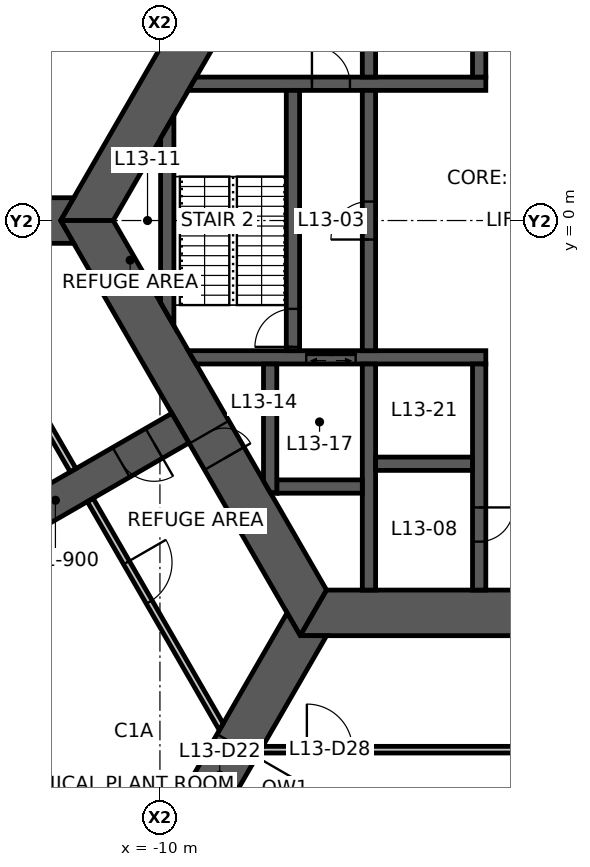
"""IFC4 building model, lengths in metres.
Left out: names, types, materials, properties, quantities, classifications, styles, units other than length and angle.
Written with IfcOpenShell. Run it as: python <this file> out.ifc"""

import sys

from ifc_helpers import new_model, si_unit, direction, frame, frame_2d, origin, place, context, subcontext, project, spatial, polyline, rectangle, outline, extrude, element, fill, save


model = new_model("IFC4")
c1 = context("Model", 3, precision=1e-05, world=origin(), true_north=direction((0.0, 1.0)))
c2 = subcontext(c1, "Body", "Model", "MODEL_VIEW")
j1 = project(units=[si_unit("LENGTHUNIT", "METRE"), si_unit("PLANEANGLEUNIT", "RADIAN")], contexts=[c1])
p1 = place(None, origin())
s1 = spatial("IfcSite", under=j1, at=p1, CompositionType="ELEMENT")
p2 = place(p1, origin())
s2 = spatial("IfcBuilding", under=s1, at=p2, CompositionType="ELEMENT")
p3 = place(p2, frame((0.0, 0.0, 52.0)))
s3 = spatial("IfcBuildingStorey", under=s2, at=p3, CompositionType="ELEMENT", Elevation=52.0)
p4 = place(p3, frame((-5.961, 10.325, 0.0), z_axis=(0.0, 0.0, 1.0), x_axis=(-0.500004296715, -0.866022923061, 0.0)))
e1 = element("IfcWall", 1, at=p4, inside=s3, PredefinedType="SHEAR", context=c2, shape_type="SweptSolid", body=[
    extrude(outline(polyline([(-0.346, -0.6), (4.494, -0.6), (5.494, -0.6), (12.269, -0.6), (11.576, 0.6), (5.494, 0.6), (4.494, 0.6), (0.346, 0.6), (-0.346, -0.6)])), origin(), (0.0, 0.0, 1.0), 5.0),
])
p5 = place(p4, frame((4.494, 0.0, 0.0)))
e2 = element("IfcOpeningElement", 2, at=p5, cuts=e1, PredefinedType="OPENING", context=c2, shape_type="SweptSolid", body=[
    extrude(rectangle(XDim=1.0, YDim=2.1, at=frame_2d((0.5, 1.05))), frame((0.0, 0.61, 0.0), z_axis=(0.0, -1.0, 0.0), x_axis=(1.0, 0.0, 0.0)), (0.0, 0.0, 1.0), 1.22),
])
p6 = place(p3, frame((-11.922, 0.0, 0.0), z_axis=(0.0, 0.0, 1.0), x_axis=(0.500004296715, -0.866022923061, 0.0)))
e3 = element("IfcWall", 3, at=p6, inside=s3, PredefinedType="SHEAR", context=c2, shape_type="SweptSolid", body=[
    extrude(outline(polyline([(-0.346, -0.6), (6.431, -0.6), (7.231, -0.6), (12.269, -0.6), (11.576, 0.6), (7.231, 0.6), (6.431, 0.6), (0.346, 0.6), (-0.346, -0.6)])), origin(), (0.0, 0.0, 1.0), 5.0),
])
p7 = place(p6, frame((6.431, 0.0, 0.0)))
e4 = element("IfcOpeningElement", 4, at=p7, cuts=e3, PredefinedType="OPENING", context=c2, shape_type="SweptSolid", body=[
    extrude(rectangle(XDim=0.8, YDim=2.1, at=frame_2d((0.4, 1.05))), frame((0.0, 0.61, 0.0), z_axis=(0.0, -1.0, 0.0), x_axis=(1.0, 0.0, 0.0)), (0.0, 0.0, 1.0), 1.22),
])
p8 = place(p3, frame((-5.961, -10.325, 0.0), z_axis=(0.0, 0.0, 1.0), x_axis=(1.0, 0.0, 0.0)))
e5 = element("IfcWall", 5, at=p8, inside=s3, PredefinedType="SHEAR", context=c2, shape_type="SweptSolid", body=[
    extrude(outline(polyline([(-0.346, -0.6), (5.461, -0.6), (6.461, -0.6), (12.269, -0.6), (11.576, 0.6), (6.461, 0.6), (5.461, 0.6), (0.346, 0.6), (-0.346, -0.6)])), origin(), (0.0, 0.0, 1.0), 5.0),
])
p9 = place(p8, frame((5.461, 0.0, 0.0)))
e6 = element("IfcOpeningElement", 6, at=p9, cuts=e5, PredefinedType="OPENING", context=c2, shape_type="SweptSolid", body=[
    extrude(rectangle(XDim=1.0, YDim=2.1, at=frame_2d((0.5, 1.05))), frame((0.0, 0.61, 0.0), z_axis=(0.0, -1.0, 0.0), x_axis=(1.0, 0.0, 0.0)), (0.0, 0.0, 1.0), 1.22),
])
p10 = place(p3, frame((-9.461, -5.462, 0.0), z_axis=(0.0, 0.0, 1.0), x_axis=(-0.866019116917, -0.500010889016, 0.0)))
e7 = element("IfcWall", 7, at=p10, inside=s3, PredefinedType="SHEAR", context=c2, shape_type="SweptSolid", body=[
    extrude(rectangle(XDim=7.595, YDim=0.9, at=frame_2d((3.798, 0.0))), origin(), (0.0, 0.0, 1.0), 5.0),
])
p11 = place(p10, frame((0.8, 0.0, 0.0)))
e8 = element("IfcOpeningElement", 8, at=p11, cuts=e7, PredefinedType="OPENING", context=c2, shape_type="SweptSolid", body=[
    extrude(rectangle(XDim=1.0, YDim=2.1, at=frame_2d((0.5, 1.05))), frame((0.0, 0.46, 0.0), z_axis=(0.0, -1.0, 0.0), x_axis=(1.0, 0.0, 0.0)), (0.0, 0.0, 1.0), 0.92),
])
p12 = place(p3, frame((-12.615, 0.0, -1.15), z_axis=(0.0, 0.0, 1.0), x_axis=(-1.0, 0.0, 0.0)))
e9 = element("IfcWall", 9, at=p12, inside=s3, PredefinedType="SHEAR", context=c2, shape_type="SweptSolid", body=[
    extrude(outline(polyline([(-0.346, -0.6), (7.385, -0.6), (7.385, 0.6), (-0.346, 0.6), (0.0, 0.0), (-0.346, -0.6)])), origin(), (0.0, 0.0, 1.0), 6.15),
])
p13 = place(p3, frame((-6.308, -10.925, -1.15), z_axis=(0.0, 0.0, 1.0), x_axis=(-0.499993363642, -0.866029235253, 0.0)))
e10 = element("IfcWall", 10, at=p13, inside=s3, PredefinedType="SHEAR", context=c2, shape_type="SweptSolid", body=[
    extrude(outline(polyline([(-0.346, -0.6), (3.338, -0.6), (5.138, -0.6), (7.385, -0.6), (7.385, 0.6), (5.138, 0.6), (3.338, 0.6), (-0.346, 0.6), (0.0, 0.0), (-0.346, -0.6)])), origin(), (0.0, 0.0, 1.0), 6.15),
])
p14 = place(p13, frame((3.338, 0.0, 1.15)))
e11 = element("IfcOpeningElement", 11, at=p14, cuts=e10, PredefinedType="OPENING", context=c2, shape_type="SweptSolid", body=[
    extrude(rectangle(XDim=1.8, YDim=2.4, at=frame_2d((0.9, 1.2))), frame((0.0, 0.61, 0.0), z_axis=(0.0, -1.0, 0.0), x_axis=(1.0, 0.0, 0.0)), (0.0, 0.0, 1.0), 1.22),
])
p15 = place(p3, frame((-10.65, 17.395, 0.0), z_axis=(0.0, 0.0, 1.0), x_axis=(-0.499999841607, -0.866025495233, 0.0)))
e12 = element("IfcWall", 12, at=p15, inside=s3, PredefinedType="ELEMENTEDWALL", context=c2, shape_type="SweptSolid", body=[
    extrude(rectangle(XDim=19.479, YDim=0.2, at=frame_2d((9.739, 0.0))), origin(), (0.0, 0.0, 1.0), 5.0),
])
p16 = place(p3, frame((-9.151, 3.6, 0.0), z_axis=(0.0, 0.0, 1.0), x_axis=(1.0, 0.0, 0.0)))
e13 = element("IfcWall", 13, at=p16, inside=s3, PredefinedType="SHEAR", context=c2, shape_type="SweptSolid", body=[
    extrude(outline(polyline([(-0.101, -0.175), (3.151, -0.175), (4.151, -0.175), (7.726, -0.175), (7.726, 0.175), (4.151, 0.175), (3.151, 0.175), (0.101, 0.175), (-0.101, -0.175)])), origin(), (0.0, 0.0, 1.0), 5.0),
])
p17 = place(p16, frame((3.151, 0.0, 0.0)))
e14 = element("IfcOpeningElement", 14, at=p17, cuts=e13, PredefinedType="OPENING", context=c2, shape_type="SweptSolid", body=[
    extrude(rectangle(XDim=1.0, YDim=2.1, at=frame_2d((0.5, 1.05))), frame((0.0, 0.185, 0.0), z_axis=(0.0, -1.0, 0.0), x_axis=(1.0, 0.0, 0.0)), (0.0, 0.0, 1.0), 0.37),
])
p18 = place(p3, frame((-9.151, -3.6, 0.0), z_axis=(0.0, 0.0, 1.0), x_axis=(1.0, 0.0, 0.0)))
e15 = element("IfcWall", 15, at=p18, inside=s3, PredefinedType="SHEAR", context=c2, shape_type="SweptSolid", body=[
    extrude(outline(polyline([(0.101, -0.175), (3.001, -0.175), (4.301, -0.175), (7.726, -0.175), (7.726, 0.175), (4.301, 0.175), (3.001, 0.175), (-0.101, 0.175), (0.101, -0.175)])), origin(), (0.0, 0.0, 1.0), 5.0),
])
p19 = place(p18, frame((3.001, 0.0, 0.0)))
e16 = element("IfcOpeningElement", 16, at=p19, cuts=e15, PredefinedType="OPENING", context=c2, shape_type="SweptSolid", body=[
    extrude(rectangle(XDim=1.3, YDim=2.1, at=frame_2d((0.65, 1.05))), frame((0.0, 0.185, 0.0), z_axis=(0.0, -1.0, 0.0), x_axis=(1.0, 0.0, 0.0)), (0.0, 0.0, 1.0), 0.37),
])
p20 = place(p3, frame((-1.6, 3.775, 0.0), z_axis=(0.0, 0.0, 1.0), x_axis=(0.0, 1.0, 0.0)))
e17 = element("IfcWall", 17, at=p20, inside=s3, PredefinedType="SHEAR", context=c2, shape_type="SweptSolid", body=[
    extrude(rectangle(XDim=5.95, YDim=0.35, at=frame_2d((2.975, 0.0))), origin(), (0.0, 0.0, 1.0), 5.0),
])
p21 = place(p20, frame((3.775, 0.0, 0.0)))
e18 = element("IfcOpeningElement", 18, at=p21, cuts=e17, PredefinedType="OPENING", context=c2, shape_type="SweptSolid", body=[
    extrude(rectangle(XDim=0.9, YDim=2.1, at=frame_2d((0.45, 1.05))), frame((0.0, 0.185, 0.0), z_axis=(0.0, -1.0, 0.0), x_axis=(1.0, 0.0, 0.0)), (0.0, 0.0, 1.0), 0.37),
])
p22 = place(p3, frame((-1.6, -3.775, 0.0), z_axis=(0.0, 0.0, 1.0), x_axis=(0.0, -1.0, 0.0)))
e19 = element("IfcWall", 19, at=p22, inside=s3, PredefinedType="SHEAR", context=c2, shape_type="SweptSolid", body=[
    extrude(rectangle(XDim=5.95, YDim=0.35, at=frame_2d((2.975, 0.0))), origin(), (0.0, 0.0, 1.0), 5.0),
])
p23 = place(p22, frame((3.775, 0.0, 0.0)))
e20 = element("IfcOpeningElement", 20, at=p23, cuts=e19, PredefinedType="OPENING", context=c2, shape_type="SweptSolid", body=[
    extrude(rectangle(XDim=0.9, YDim=2.1, at=frame_2d((0.45, 1.05))), frame((0.0, 0.185, 0.0), z_axis=(0.0, -1.0, 0.0), x_axis=(1.0, 0.0, 0.0)), (0.0, 0.0, 1.0), 0.37),
])
p24 = place(p3, frame((-4.5, -3.425, 0.0), z_axis=(0.0, 0.0, 1.0), x_axis=(0.0, 1.0, 0.0)))
e21 = element("IfcWall", 21, at=p24, inside=s3, PredefinedType="SHEAR", context=c2, shape_type="SweptSolid", body=[
    extrude(rectangle(XDim=6.85, YDim=0.35, at=frame_2d((3.425, 0.0))), origin(), (0.0, 0.0, 1.0), 5.0),
])
p25 = place(p24, frame((2.925, 0.0, 0.0)))
e22 = element("IfcOpeningElement", 22, at=p25, cuts=e21, PredefinedType="OPENING", context=c2, shape_type="SweptSolid", body=[
    extrude(rectangle(XDim=1.0, YDim=2.1, at=frame_2d((0.5, 1.05))), frame((0.0, 0.185, 0.0), z_axis=(0.0, -1.0, 0.0), x_axis=(1.0, 0.0, 0.0)), (0.0, 0.0, 1.0), 0.37),
])
p26 = place(p3, frame((-6.5, -3.425, 0.0), z_axis=(0.0, 0.0, 1.0), x_axis=(0.0, 1.0, 0.0)))
e23 = element("IfcWall", 23, at=p26, inside=s3, PredefinedType="SHEAR", context=c2, shape_type="SweptSolid", body=[
    extrude(rectangle(XDim=6.85, YDim=0.35, at=frame_2d((3.425, 0.0))), origin(), (0.0, 0.0, 1.0), 5.0),
])
p27 = place(p26, frame((0.1, 0.0, 0.0)))
e24 = element("IfcOpeningElement", 24, at=p27, cuts=e23, PredefinedType="OPENING", context=c2, shape_type="SweptSolid", body=[
    extrude(rectangle(XDim=1.0, YDim=2.1, at=frame_2d((0.5, 1.05))), frame((0.0, 0.185, 0.0), z_axis=(0.0, -1.0, 0.0), x_axis=(1.0, 0.0, 0.0)), (0.0, 0.0, 1.0), 0.37),
])
for number, where, z_axis, x_axis in (
    (25, (-4.5, 3.775, 0.0), (0.0, 0.0, 1.0), (0.0, 1.0, 0.0)),
    (26, (-4.5, -3.775, 0.0), (0.0, 0.0, 1.0), (0.0, -1.0, 0.0)),
):
    element("IfcWall", number, at=place(p3, frame(where, z_axis=z_axis, x_axis=x_axis)), inside=s3, PredefinedType="SHEAR", context=c2, shape_type="SweptSolid", body=[
        extrude(rectangle(XDim=5.95, YDim=0.35, at=frame_2d((2.975, 0.0))), origin(), (0.0, 0.0, 1.0), 5.0),
    ])
p28 = place(p3, frame((-4.325, -6.4, 0.0), z_axis=(0.0, 0.0, 1.0), x_axis=(1.0, 0.0, 0.0)))
e27 = element("IfcWall", 27, at=p28, inside=s3, PredefinedType="SHEAR", context=c2, shape_type="SweptSolid", body=[
    extrude(rectangle(XDim=2.55, YDim=0.35, at=frame_2d((1.275, 0.0))), origin(), (0.0, 0.0, 1.0), 5.0),
])
p29 = place(p3, frame((-6.925, -7.0, 0.0), z_axis=(0.0, 0.0, 1.0), x_axis=(1.0, 0.0, 0.0)))
e28 = element("IfcWall", 28, at=p29, inside=s3, PredefinedType="SHEAR", context=c2, shape_type="SweptSolid", body=[
    extrude(rectangle(XDim=2.25, YDim=0.35, at=frame_2d((1.125, 0.0))), origin(), (0.0, 0.0, 1.0), 5.0),
])
p30 = place(p3, frame((-7.1, -3.775, 0.0), z_axis=(0.0, 0.0, 1.0), x_axis=(0.0, -1.0, 0.0)))
e29 = element("IfcWall", 29, at=p30, inside=s3, PredefinedType="SHEAR", context=c2, shape_type="SweptSolid", body=[
    extrude(outline(polyline([(0.0, -0.175), (3.074, -0.175), (3.377, 0.0), (3.4, 0.175), (0.0, 0.175), (0.0, -0.175)])), origin(), (0.0, 0.0, 1.0), 5.0),
])
p31 = place(p3, frame((-9.808, -2.462, 0.0), z_axis=(0.0, 0.0, 1.0), x_axis=(0.0, 1.0, 0.0)))
e30 = element("IfcWall", 30, at=p31, inside=s3, PredefinedType="SHEAR", context=c2, shape_type="SweptSolid", body=[
    extrude(outline(polyline([(-0.303, -0.175), (5.228, -0.175), (4.621, 0.175), (0.303, 0.175), (-0.303, -0.175)])), origin(), (0.0, 0.0, 1.0), 5.0),
])
p32 = place(p3, frame((-8.386, 13.325, 0.0), z_axis=(0.0, 0.0, 1.0), x_axis=(-0.500011547171, -0.866018736919, 0.0)))
e31 = element("IfcWall", 31, at=p32, inside=s3, PredefinedType="PARTITIONING", context=c2, shape_type="SweptSolid", body=[
    extrude(outline(polyline([(-0.051, -0.087), (1.213, -0.087), (2.413, -0.087), (14.744, -0.087), (14.643, 0.087), (2.413, 0.087), (1.213, 0.087), (0.051, 0.087), (-0.051, -0.087)])), origin(), (0.0, 0.0, 1.0), 4.83),
])
p33 = place(p32, frame((1.213, 0.0, 0.0)))
e32 = element("IfcOpeningElement", 32, at=p33, cuts=e31, PredefinedType="OPENING", context=c2, shape_type="SweptSolid", body=[
    extrude(rectangle(XDim=1.2, YDim=2.1, at=frame_2d((0.6, 1.05))), frame((0.0, 0.098, 0.0), z_axis=(0.0, -1.0, 0.0), x_axis=(1.0, 0.0, 0.0)), (0.0, 0.0, 1.0), 0.195),
])
p34 = place(p3, frame((-15.733, -0.6, 0.0), z_axis=(0.0, 0.0, 1.0), x_axis=(0.500013761451, -0.866017458461, 0.0)))
e33 = element("IfcWall", 33, at=p34, inside=s3, PredefinedType="PARTITIONING", context=c2, shape_type="SweptSolid", body=[
    extrude(outline(polyline([(-0.051, -0.087), (6.892, -0.087), (6.892, 0.087), (0.051, 0.087), (-0.051, -0.087)])), origin(), (0.0, 0.0, 1.0), 4.83),
])
p35 = place(p3, frame((-11.832, -7.356, 0.0), z_axis=(0.0, 0.0, 1.0), x_axis=(0.49998719302, -0.866032797772, 0.0)))
e34 = element("IfcWall", 34, at=p35, inside=s3, PredefinedType="PARTITIONING", context=c2, shape_type="SweptSolid", body=[
    extrude(outline(polyline([(0.0, -0.087), (1.9, -0.087), (3.1, -0.087), (6.942, -0.087), (6.841, 0.087), (3.1, 0.087), (1.9, 0.087), (0.0, 0.087), (0.0, -0.087)])), origin(), (0.0, 0.0, 1.0), 4.83),
])
p36 = place(p35, frame((1.9, 0.0, 0.0)))
e35 = element("IfcOpeningElement", 35, at=p36, cuts=e34, PredefinedType="OPENING", context=c2, shape_type="SweptSolid", body=[
    extrude(rectangle(XDim=1.2, YDim=2.1, at=frame_2d((0.6, 1.05))), frame((0.0, 0.098, 0.0), z_axis=(0.0, -1.0, 0.0), x_axis=(1.0, 0.0, 0.0)), (0.0, 0.0, 1.0), 0.195),
])
p37 = place(p3, frame((-7.347, -13.925, 0.0), z_axis=(0.0, 0.0, 1.0), x_axis=(1.0, 0.0, 0.0)))
e36 = element("IfcWall", 36, at=p37, inside=s3, PredefinedType="PARTITIONING", context=c2, shape_type="SweptSolid", body=[
    extrude(outline(polyline([(-0.051, -0.087), (1.213, -0.087), (2.413, -0.087), (14.744, -0.087), (14.643, 0.087), (2.413, 0.087), (1.213, 0.087), (0.051, 0.087), (-0.051, -0.087)])), origin(), (0.0, 0.0, 1.0), 4.83),
])
p38 = place(p37, frame((1.213, 0.0, 0.0)))
e37 = element("IfcOpeningElement", 37, at=p38, cuts=e36, PredefinedType="OPENING", context=c2, shape_type="SweptSolid", body=[
    extrude(rectangle(XDim=1.2, YDim=2.1, at=frame_2d((0.6, 1.05))), frame((0.0, 0.098, 0.0), z_axis=(0.0, -1.0, 0.0), x_axis=(1.0, 0.0, 0.0)), (0.0, 0.0, 1.0), 0.195),
])
p39 = place(p7, origin())
e38 = element("IfcDoor", 38, at=p39, inside=s3, OperationType="SINGLE_SWING_RIGHT", PredefinedType="DOOR", context=c2, shape_type="SweptSolid", body=[
    extrude(rectangle(XDim=0.8, YDim=2.1, at=frame_2d((0.4, 1.05))), frame((0.0, 0.025, 0.0), z_axis=(0.0, -1.0, 0.0), x_axis=(1.0, 0.0, 0.0)), (0.0, 0.0, 1.0), 0.05),
])
fill(e4, e38)
p40 = place(p25, origin())
e39 = element("IfcDoor", 39, at=p40, inside=s3, OperationType="SINGLE_SWING_LEFT", PredefinedType="DOOR", context=c2, shape_type="SweptSolid", body=[
    extrude(rectangle(XDim=1.0, YDim=2.1, at=frame_2d((0.5, 1.05))), frame((0.0, 0.025, 0.0), z_axis=(0.0, -1.0, 0.0), x_axis=(1.0, 0.0, 0.0)), (0.0, 0.0, 1.0), 0.05),
])
fill(e22, e39)
p41 = place(p27, origin())
e40 = element("IfcDoor", 40, at=p41, inside=s3, OperationType="SINGLE_SWING_LEFT", PredefinedType="DOOR", context=c2, shape_type="SweptSolid", body=[
    extrude(rectangle(XDim=1.0, YDim=2.1, at=frame_2d((0.5, 1.05))), frame((0.0, 0.025, 0.0), z_axis=(0.0, -1.0, 0.0), x_axis=(1.0, 0.0, 0.0)), (0.0, 0.0, 1.0), 0.05),
])
fill(e24, e40)
p42 = place(p17, origin())
e41 = element("IfcDoor", 41, at=p42, inside=s3, OperationType="SINGLE_SWING_LEFT", PredefinedType="DOOR", context=c2, shape_type="SweptSolid", body=[
    extrude(rectangle(XDim=1.0, YDim=2.1, at=frame_2d((0.5, 1.05))), frame((0.0, 0.025, 0.0), z_axis=(0.0, -1.0, 0.0), x_axis=(1.0, 0.0, 0.0)), (0.0, 0.0, 1.0), 0.05),
])
fill(e14, e41)
p43 = place(p23, origin())
e42 = element("IfcDoor", 42, at=p43, inside=s3, OperationType="SINGLE_SWING_LEFT", PredefinedType="DOOR", context=c2, shape_type="SweptSolid", body=[
    extrude(rectangle(XDim=0.9, YDim=2.1, at=frame_2d((0.45, 1.05))), frame((0.0, 0.025, 0.0), z_axis=(0.0, -1.0, 0.0), x_axis=(1.0, 0.0, 0.0)), (0.0, 0.0, 1.0), 0.05),
])
fill(e20, e42)
p44 = place(p11, origin())
e43 = element("IfcDoor", 43, at=p44, inside=s3, OperationType="SINGLE_SWING_LEFT", PredefinedType="DOOR", context=c2, shape_type="SweptSolid", body=[
    extrude(rectangle(XDim=1.0, YDim=2.1, at=frame_2d((0.5, 1.05))), frame((0.0, 0.025, 0.0), z_axis=(0.0, -1.0, 0.0), x_axis=(1.0, 0.0, 0.0)), (0.0, 0.0, 1.0), 0.05),
])
fill(e8, e43)
p45 = place(p14, origin())
e44 = element("IfcDoor", 44, at=p45, inside=s3, OperationType="DOUBLE_DOOR_SINGLE_SWING", PredefinedType="DOOR", context=c2, shape_type="SweptSolid", body=[
    extrude(rectangle(XDim=1.8, YDim=2.4, at=frame_2d((0.9, 1.2))), frame((0.0, 0.025, 0.0), z_axis=(0.0, -1.0, 0.0), x_axis=(1.0, 0.0, 0.0)), (0.0, 0.0, 1.0), 0.05),
])
fill(e11, e44)
p46 = place(p36, origin())
e45 = element("IfcDoor", 45, at=p46, inside=s3, OperationType="DOUBLE_DOOR_SINGLE_SWING", PredefinedType="DOOR", context=c2, shape_type="SweptSolid", body=[
    extrude(rectangle(XDim=1.2, YDim=2.1, at=frame_2d((0.6, 1.05))), frame((0.0, 0.025, 0.0), z_axis=(0.0, -1.0, 0.0), x_axis=(1.0, 0.0, 0.0)), (0.0, 0.0, 1.0), 0.05),
])
fill(e35, e45)
p47 = place(p38, origin())
e46 = element("IfcDoor", 46, at=p47, inside=s3, OperationType="DOUBLE_DOOR_SINGLE_SWING", PredefinedType="DOOR", context=c2, shape_type="SweptSolid", body=[
    extrude(rectangle(XDim=1.2, YDim=2.1, at=frame_2d((0.6, 1.05))), frame((0.0, 0.025, 0.0), z_axis=(0.0, -1.0, 0.0), x_axis=(1.0, 0.0, 0.0)), (0.0, 0.0, 1.0), 0.05),
])
fill(e37, e46)
p48 = place(p19, origin())
e47 = element("IfcDoor", 47, at=p48, inside=s3, OperationType="DOUBLE_DOOR_SLIDING", PredefinedType="DOOR", context=c2, shape_type="SweptSolid", body=[
    extrude(rectangle(XDim=1.3, YDim=2.1, at=frame_2d((0.65, 1.05))), frame((0.0, 0.025, 0.0), z_axis=(0.0, -1.0, 0.0), x_axis=(1.0, 0.0, 0.0)), (0.0, 0.0, 1.0), 0.05),
])
fill(e16, e47)
save(model, sys.argv[1])
